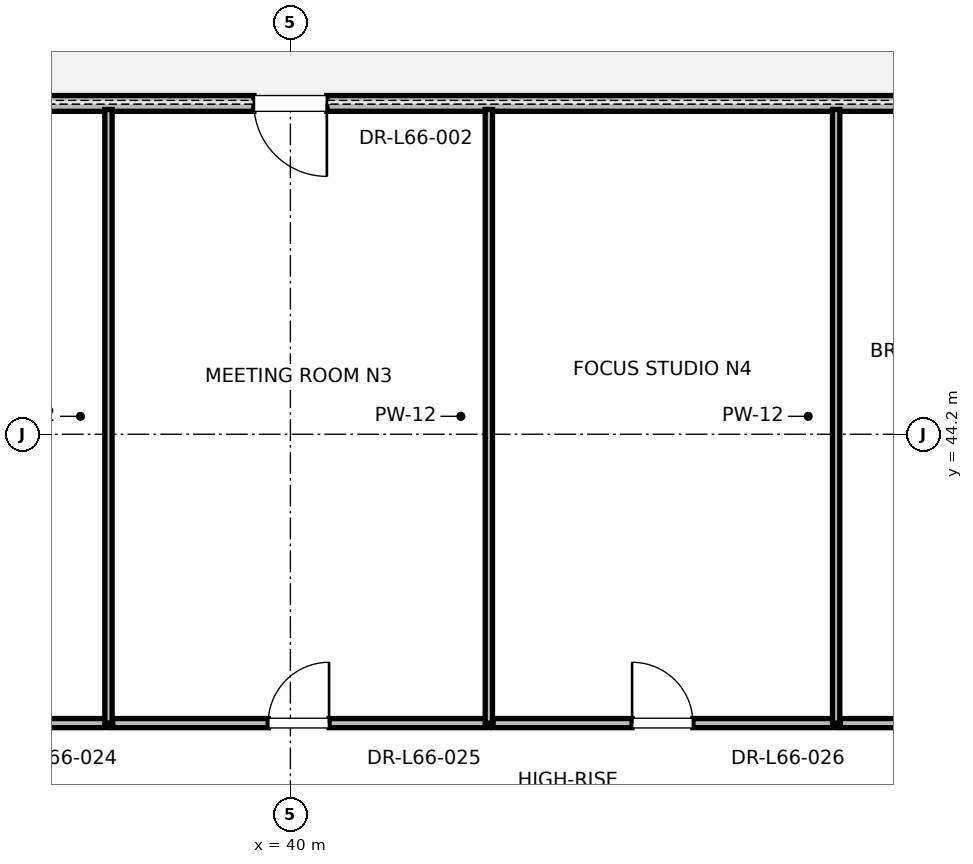
"""IFC4 building model, lengths in metres.
Left out: names, types, materials, properties, quantities, classifications, styles, units other than length and angle.
Written with IfcOpenShell. Run it as: python <this file> out.ifc"""

import sys

from ifc_helpers import new_model, si_unit, direction, frame, frame_2d, origin, place, context, subcontext, project, spatial, rectangle, extrude, element, fill, save


model = new_model("IFC4")
c1 = context("Model", 3, precision=1e-05, world=origin(), true_north=direction((0.0, 1.0)))
c2 = subcontext(c1, "Body", "Model", "MODEL_VIEW")
j1 = project(units=[si_unit("LENGTHUNIT", "METRE"), si_unit("PLANEANGLEUNIT", "RADIAN")], contexts=[c1])
p1 = place(None, origin())
s1 = spatial("IfcSite", under=j1, at=p1, CompositionType="ELEMENT")
p2 = place(p1, origin())
s2 = spatial("IfcBuilding", under=s1, at=p2, CompositionType="ELEMENT")
p3 = place(p2, frame((0.0, 0.0, 283.2)))
s3 = spatial("IfcBuildingStorey", under=s2, at=p3, CompositionType="ELEMENT", Elevation=283.2)
p4 = place(p3, frame((61.631, 49.64, 0.0), z_axis=(0.0, 0.0, 1.0), x_axis=(-1.0, 0.0, 0.0)))
e1 = element("IfcWall", 1, at=p4, inside=s3, PredefinedType="PARAPET", context=c2, shape_type="SweptSolid", body=[
    extrude(rectangle(XDim=43.263, YDim=0.26, at=frame_2d((21.631, 0.0))), origin(), (0.0, 0.0, 1.0), 3.123),
])
p5 = place(p4, frame((4.2, 0.0, 0.85)))
e2 = element("IfcOpeningElement", 2, at=p5, cuts=e1, PredefinedType="OPENING", context=c2, shape_type="SweptSolid", body=[
    extrude(rectangle(XDim=1.6, YDim=2.1, at=frame_2d((0.8, 1.05))), frame((0.0, 0.13, 0.0), z_axis=(0.0, -1.0, 0.0), x_axis=(1.0, 0.0, 0.0)), (0.0, 0.0, 1.0), 0.26),
])
p6 = place(p4, frame((21.031, 0.0, 0.0)))
e3 = element("IfcOpeningElement", 3, at=p6, cuts=e1, PredefinedType="OPENING", context=c2, shape_type="SweptSolid", body=[
    extrude(rectangle(XDim=1.2, YDim=2.2, at=frame_2d((0.6, 1.1))), frame((0.0, 0.13, 0.0), z_axis=(0.0, -1.0, 0.0), x_axis=(1.0, 0.0, 0.0)), (0.0, 0.0, 1.0), 0.26),
])
p7 = place(p4, frame((37.463, 0.0, 0.85)))
e4 = element("IfcOpeningElement", 4, at=p7, cuts=e1, PredefinedType="OPENING", context=c2, shape_type="SweptSolid", body=[
    extrude(rectangle(XDim=1.6, YDim=2.1, at=frame_2d((0.8, 1.05))), frame((0.0, 0.13, 0.0), z_axis=(0.0, -1.0, 0.0), x_axis=(1.0, 0.0, 0.0)), (0.0, 0.0, 1.0), 0.26),
])
p8 = place(p3, frame((31.366, 39.45, 0.0), z_axis=(0.0, 0.0, 1.0), x_axis=(1.0, 0.0, 0.0)))
e5 = element("IfcWall", 5, at=p8, inside=s3, PredefinedType="PARTITIONING", context=c2, shape_type="SweptSolid", body=[
    extrude(rectangle(XDim=5.642, YDim=0.15, at=frame_2d((2.821, 0.0))), origin(), (0.0, 0.0, 1.0), 2.85),
])
p9 = place(p8, frame((2.036, 0.0, 0.0)))
e6 = element("IfcOpeningElement", 6, at=p9, cuts=e5, PredefinedType="OPENING", context=c2, shape_type="SweptSolid", body=[
    extrude(rectangle(XDim=1.5, YDim=2.25, at=frame_2d((0.75, 1.125))), frame((0.0, 0.075, 0.0), z_axis=(0.0, -1.0, 0.0), x_axis=(1.0, 0.0, 0.0)), (0.0, 0.0, 1.0), 0.15),
])
p10 = place(p3, frame((37.008, 39.45, 0.0), z_axis=(0.0, 0.0, 1.0), x_axis=(0.0, 1.0, 0.0)))
e7 = element("IfcWall", 7, at=p10, inside=s3, PredefinedType="PARTITIONING", context=c2, shape_type="SweptSolid", body=[
    extrude(rectangle(XDim=10.09, YDim=0.12, at=frame_2d((5.045, 0.0))), origin(), (0.0, 0.0, 1.0), 2.415),
])
p11 = place(p3, frame((37.078, 39.45, 0.0), z_axis=(0.0, 0.0, 1.0), x_axis=(1.0, 0.0, 0.0)))
e8 = element("IfcWall", 8, at=p11, inside=s3, PredefinedType="PARTITIONING", context=c2, shape_type="SweptSolid", body=[
    extrude(rectangle(XDim=6.186, YDim=0.15, at=frame_2d((3.093, 0.0))), origin(), (0.0, 0.0, 1.0), 2.85),
])
p12 = place(p11, frame((2.558, 0.0, 0.0)))
e9 = element("IfcOpeningElement", 9, at=p12, cuts=e8, PredefinedType="OPENING", context=c2, shape_type="SweptSolid", body=[
    extrude(rectangle(XDim=1.0, YDim=2.15, at=frame_2d((0.5, 1.075))), frame((0.0, 0.075, 0.0), z_axis=(0.0, -1.0, 0.0), x_axis=(1.0, 0.0, 0.0)), (0.0, 0.0, 1.0), 0.15),
])
p13 = place(p3, frame((43.264, 39.45, 0.0), z_axis=(0.0, 0.0, 1.0), x_axis=(0.0, 1.0, 0.0)))
e10 = element("IfcWall", 10, at=p13, inside=s3, PredefinedType="PARTITIONING", context=c2, shape_type="SweptSolid", body=[
    extrude(rectangle(XDim=10.09, YDim=0.12, at=frame_2d((5.045, 0.0))), origin(), (0.0, 0.0, 1.0), 2.415),
])
p14 = place(p3, frame((43.334, 39.45, 0.0), z_axis=(0.0, 0.0, 1.0), x_axis=(1.0, 0.0, 0.0)))
e11 = element("IfcWall", 11, at=p14, inside=s3, PredefinedType="PARTITIONING", context=c2, shape_type="SweptSolid", body=[
    extrude(rectangle(XDim=5.642, YDim=0.15, at=frame_2d((2.821, 0.0))), origin(), (0.0, 0.0, 1.0), 2.85),
])
p15 = place(p14, frame((2.286, 0.0, 0.0)))
e12 = element("IfcOpeningElement", 12, at=p15, cuts=e11, PredefinedType="OPENING", context=c2, shape_type="SweptSolid", body=[
    extrude(rectangle(XDim=1.0, YDim=2.15, at=frame_2d((0.5, 1.075))), frame((0.0, 0.075, 0.0), z_axis=(0.0, -1.0, 0.0), x_axis=(1.0, 0.0, 0.0)), (0.0, 0.0, 1.0), 0.15),
])
p16 = place(p3, frame((48.976, 39.45, 0.0), z_axis=(0.0, 0.0, 1.0), x_axis=(0.0, 1.0, 0.0)))
e13 = element("IfcWall", 13, at=p16, inside=s3, PredefinedType="PARTITIONING", context=c2, shape_type="SweptSolid", body=[
    extrude(rectangle(XDim=10.09, YDim=0.12, at=frame_2d((5.045, 0.0))), origin(), (0.0, 0.0, 1.0), 2.415),
])
p17 = place(p3, frame((49.046, 39.45, 0.0), z_axis=(0.0, 0.0, 1.0), x_axis=(1.0, 0.0, 0.0)))
e14 = element("IfcWall", 14, at=p17, inside=s3, PredefinedType="PARTITIONING", context=c2, shape_type="SweptSolid", body=[
    extrude(rectangle(XDim=4.554, YDim=0.15, at=frame_2d((2.277, 0.0))), origin(), (0.0, 0.0, 1.0), 2.85),
])
p18 = place(p17, frame((1.727, 0.0, 0.0)))
e15 = element("IfcOpeningElement", 15, at=p18, cuts=e14, PredefinedType="OPENING", context=c2, shape_type="SweptSolid", body=[
    extrude(rectangle(XDim=1.0, YDim=2.15, at=frame_2d((0.5, 1.075))), frame((0.0, 0.075, 0.0), z_axis=(0.0, -1.0, 0.0), x_axis=(1.0, 0.0, 0.0)), (0.0, 0.0, 1.0), 0.15),
])
p19 = place(p6, origin())
e16 = element("IfcDoor", 16, at=p19, inside=s3, OperationType="SINGLE_SWING_LEFT", PredefinedType="DOOR", context=c2, shape_type="SweptSolid", body=[
    extrude(rectangle(XDim=1.2, YDim=2.2, at=frame_2d((0.6, 1.1))), frame((0.0, 0.025, 0.0), z_axis=(0.0, -1.0, 0.0), x_axis=(1.0, 0.0, 0.0)), (0.0, 0.0, 1.0), 0.05),
])
fill(e3, e16)
p20 = place(p12, origin())
e17 = element("IfcDoor", 17, at=p20, inside=s3, OperationType="SINGLE_SWING_RIGHT", PredefinedType="DOOR", context=c2, shape_type="SweptSolid", body=[
    extrude(rectangle(XDim=1.0, YDim=2.15, at=frame_2d((0.5, 1.075))), frame((0.0, 0.025, 0.0), z_axis=(0.0, -1.0, 0.0), x_axis=(1.0, 0.0, 0.0)), (0.0, 0.0, 1.0), 0.05),
])
fill(e9, e17)
p21 = place(p15, origin())
e18 = element("IfcDoor", 18, at=p21, inside=s3, OperationType="SINGLE_SWING_LEFT", PredefinedType="DOOR", context=c2, shape_type="SweptSolid", body=[
    extrude(rectangle(XDim=1.0, YDim=2.15, at=frame_2d((0.5, 1.075))), frame((0.0, 0.025, 0.0), z_axis=(0.0, -1.0, 0.0), x_axis=(1.0, 0.0, 0.0)), (0.0, 0.0, 1.0), 0.05),
])
fill(e12, e18)
save(model, sys.argv[1])
